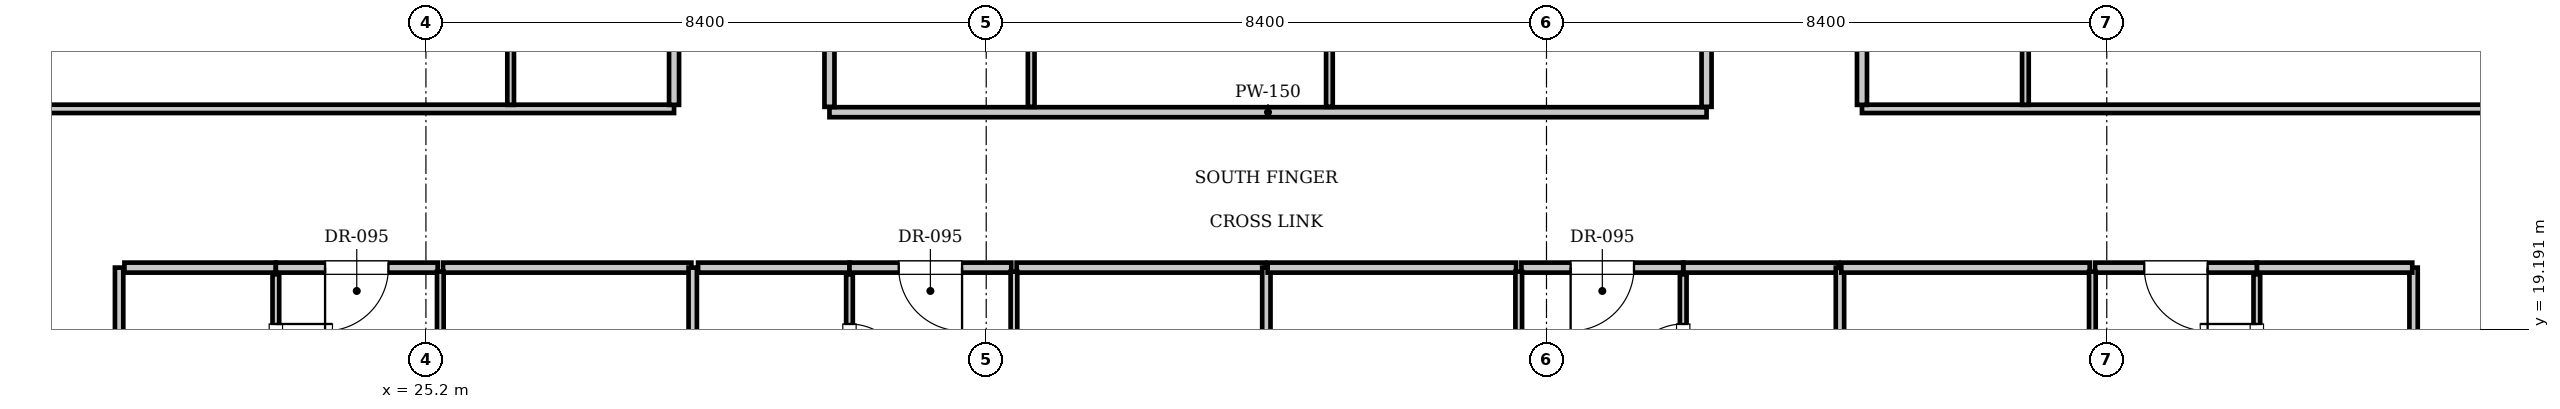
"""IFC4 building model, lengths in metres.
Left out: names, types, materials, properties, quantities, classifications, styles, units other than length and angle.
Written with IfcOpenShell. Run it as: python <this file> out.ifc"""

import sys

from ifc_helpers import new_model, si_unit, direction, frame, frame_2d, origin, place, context, subcontext, project, spatial, rectangle, extrude, element, fill, save


model = new_model("IFC4")
c1 = context("Model", 3, precision=1e-05, world=origin(), true_north=direction((0.0, 1.0)))
c2 = subcontext(c1, "Body", "Model", "MODEL_VIEW")
j1 = project(units=[si_unit("LENGTHUNIT", "METRE"), si_unit("PLANEANGLEUNIT", "RADIAN")], contexts=[c1])
p1 = place(None, origin())
s1 = spatial("IfcSite", under=j1, at=p1, CompositionType="ELEMENT")
p2 = place(p1, origin())
s2 = spatial("IfcBuilding", under=s1, at=p2, CompositionType="ELEMENT")
p3 = place(p2, frame((0.0, 0.0, 258.65)))
s3 = spatial("IfcBuildingStorey", under=s2, at=p3, CompositionType="ELEMENT", Elevation=258.65)
p4 = place(p3, frame((31.25, 22.45, 0.0), z_axis=(0.0, 0.0, 1.0), x_axis=(1.0, 0.0, 0.0)))
e1 = element("IfcWall", 1, at=p4, inside=s3, PredefinedType="PARTITIONING", context=c2, shape_type="SweptSolid", body=[
    extrude(rectangle(XDim=13.15, YDim=0.15, at=frame_2d((6.575, 0.0))), origin(), (0.0, 0.0, 1.0), 3.61),
])
for number, where, z_axis, x_axis in (
    (2, (31.25, 22.53, 0.0), (0.0, 0.0, 1.0), (0.0, 1.0, 0.0)),
    (3, (44.4, 22.53, 0.0), (0.0, 0.0, 1.0), (0.0, 1.0, 0.0)),
):
    element("IfcWall", number, at=place(p3, frame(where, z_axis=z_axis, x_axis=x_axis)), inside=s3, PredefinedType="PARTITIONING", context=c2, shape_type="SweptSolid", body=[
        extrude(rectangle(XDim=8.89, YDim=0.15, at=frame_2d((4.445, 0.0))), origin(), (0.0, 0.0, 1.0), 3.61),
    ])
for number, where, z_axis, x_axis in (
    (4, (34.274, 22.53, 0.0), (0.0, 0.0, 1.0), (0.0, 1.0, 0.0)),
    (5, (38.746, 22.53, 0.0), (0.0, 0.0, 1.0), (0.0, 1.0, 0.0)),
):
    element("IfcWall", number, at=place(p3, frame(where, z_axis=z_axis, x_axis=x_axis)), inside=s3, PredefinedType="PARTITIONING", context=c2, shape_type="SweptSolid", body=[
        extrude(rectangle(XDim=8.89, YDim=0.1, at=frame_2d((4.445, 0.0))), origin(), (0.0, 0.0, 1.0), 3.61),
    ])
for number, where, z_axis, x_axis in (
    (6, (20.6, 14.4, 0.0), (0.0, 0.0, 1.0), (0.0, 1.0, 0.0)),
    (7, (55.0, 14.4, 0.0), (0.0, 0.0, 1.0), (0.0, 1.0, 0.0)),
):
    element("IfcWall", number, at=place(p3, frame(where, z_axis=z_axis, x_axis=x_axis)), inside=s3, PredefinedType="PARTITIONING", context=c2, shape_type="SweptSolid", body=[
        extrude(rectangle(XDim=5.72, YDim=0.125, at=frame_2d((2.86, 0.0))), origin(), (0.0, 0.0, 1.0), 3.61),
    ])
p5 = place(p3, frame((20.68, 20.12, 0.0), z_axis=(0.0, 0.0, 1.0), x_axis=(1.0, 0.0, 0.0)))
e8 = element("IfcWall", 8, at=p5, inside=s3, PredefinedType="PARTITIONING", context=c2, shape_type="SweptSolid", body=[
    extrude(rectangle(XDim=2.27, YDim=0.15, at=frame_2d((1.135, 0.0))), origin(), (0.0, 0.0, 1.0), 3.61),
])
p6 = place(p3, frame((22.95, 17.68, 0.0), z_axis=(0.0, 0.0, 1.0), x_axis=(0.0, 1.0, 0.0)))
e9 = element("IfcWall", 9, at=p6, inside=s3, PredefinedType="PARTITIONING", context=c2, shape_type="SweptSolid", body=[
    extrude(rectangle(XDim=2.34, YDim=0.1, at=frame_2d((1.17, 0.0))), origin(), (0.0, 0.0, 1.0), 3.61),
])
p7 = place(p6, frame((0.745, 0.0, 0.0)))
e10 = element("IfcOpeningElement", 10, at=p7, cuts=e9, PredefinedType="OPENING", context=c2, shape_type="SweptSolid", body=[
    extrude(rectangle(XDim=0.85, YDim=2.1, at=frame_2d((0.425, 1.05))), frame((0.0, 0.06, 0.0), z_axis=(0.0, -1.0, 0.0), x_axis=(1.0, 0.0, 0.0)), (0.0, 0.0, 1.0), 0.12),
])
p8 = place(p3, frame((22.95, 20.12, 0.0), z_axis=(0.0, 0.0, 1.0), x_axis=(1.0, 0.0, 0.0)))
e11 = element("IfcWall", 11, at=p8, inside=s3, PredefinedType="PARTITIONING", context=c2, shape_type="SweptSolid", body=[
    extrude(rectangle(XDim=2.426, YDim=0.15, at=frame_2d((1.213, 0.0))), origin(), (0.0, 0.0, 1.0), 3.61),
])
p9 = place(p8, frame((0.738, 0.0, 0.0)))
e12 = element("IfcOpeningElement", 12, at=p9, cuts=e11, PredefinedType="OPENING", context=c2, shape_type="SweptSolid", body=[
    extrude(rectangle(XDim=0.95, YDim=2.15, at=frame_2d((0.475, 1.075))), frame((0.0, 0.085, 0.0), z_axis=(0.0, -1.0, 0.0), x_axis=(1.0, 0.0, 0.0)), (0.0, 0.0, 1.0), 0.17),
])
p10 = place(p3, frame((25.456, 20.12, 0.0), z_axis=(0.0, 0.0, 1.0), x_axis=(1.0, 0.0, 0.0)))
e13 = element("IfcWall", 13, at=p10, inside=s3, PredefinedType="PARTITIONING", context=c2, shape_type="SweptSolid", body=[
    extrude(rectangle(XDim=3.724, YDim=0.15, at=frame_2d((1.862, 0.0))), origin(), (0.0, 0.0, 1.0), 3.61),
])
p11 = place(p3, frame((25.416, 9.23, 0.0), z_axis=(0.0, 0.0, 1.0), x_axis=(0.0, 1.0, 0.0)))
e14 = element("IfcWall", 14, at=p11, inside=s3, PredefinedType="PARTITIONING", context=c2, shape_type="SweptSolid", body=[
    extrude(rectangle(XDim=10.83, YDim=0.1, at=frame_2d((5.415, 0.0))), origin(), (0.0, 0.0, 1.0), 3.61),
])
p12 = place(p11, frame((1.6, 0.0, 0.0)))
e15 = element("IfcOpeningElement", 15, at=p12, cuts=e14, PredefinedType="OPENING", context=c2, shape_type="SweptSolid", body=[
    extrude(rectangle(XDim=0.9, YDim=2.1, at=frame_2d((0.45, 1.05))), frame((0.0, 0.06, 0.0), z_axis=(0.0, -1.0, 0.0), x_axis=(1.0, 0.0, 0.0)), (0.0, 0.0, 1.0), 0.12),
])
p13 = place(p3, frame((29.2, 9.3, 0.0), z_axis=(0.0, 0.0, 1.0), x_axis=(0.0, 1.0, 0.0)))
e16 = element("IfcWall", 16, at=p13, inside=s3, PredefinedType="PARTITIONING", context=c2, shape_type="SweptSolid", body=[
    extrude(rectangle(XDim=10.82, YDim=0.125, at=frame_2d((5.41, 0.0))), origin(), (0.0, 0.0, 1.0), 3.61),
])
p14 = place(p3, frame((29.28, 20.12, 0.0), z_axis=(0.0, 0.0, 1.0), x_axis=(1.0, 0.0, 0.0)))
e17 = element("IfcWall", 17, at=p14, inside=s3, PredefinedType="PARTITIONING", context=c2, shape_type="SweptSolid", body=[
    extrude(rectangle(XDim=2.27, YDim=0.15, at=frame_2d((1.135, 0.0))), origin(), (0.0, 0.0, 1.0), 3.61),
])
p15 = place(p3, frame((31.55, 17.68, 0.0), z_axis=(0.0, 0.0, 1.0), x_axis=(0.0, 1.0, 0.0)))
e18 = element("IfcWall", 18, at=p15, inside=s3, PredefinedType="PARTITIONING", context=c2, shape_type="SweptSolid", body=[
    extrude(rectangle(XDim=2.34, YDim=0.1, at=frame_2d((1.17, 0.0))), origin(), (0.0, 0.0, 1.0), 3.61),
])
p16 = place(p15, frame((0.745, 0.0, 0.0)))
e19 = element("IfcOpeningElement", 19, at=p16, cuts=e18, PredefinedType="OPENING", context=c2, shape_type="SweptSolid", body=[
    extrude(rectangle(XDim=0.85, YDim=2.1, at=frame_2d((0.425, 1.05))), frame((0.0, 0.06, 0.0), z_axis=(0.0, -1.0, 0.0), x_axis=(1.0, 0.0, 0.0)), (0.0, 0.0, 1.0), 0.12),
])
p17 = place(p3, frame((31.55, 20.12, 0.0), z_axis=(0.0, 0.0, 1.0), x_axis=(1.0, 0.0, 0.0)))
e20 = element("IfcWall", 20, at=p17, inside=s3, PredefinedType="PARTITIONING", context=c2, shape_type="SweptSolid", body=[
    extrude(rectangle(XDim=2.426, YDim=0.15, at=frame_2d((1.213, 0.0))), origin(), (0.0, 0.0, 1.0), 3.61),
])
p18 = place(p17, frame((0.738, 0.0, 0.0)))
e21 = element("IfcOpeningElement", 21, at=p18, cuts=e20, PredefinedType="OPENING", context=c2, shape_type="SweptSolid", body=[
    extrude(rectangle(XDim=0.95, YDim=2.15, at=frame_2d((0.475, 1.075))), frame((0.0, 0.085, 0.0), z_axis=(0.0, -1.0, 0.0), x_axis=(1.0, 0.0, 0.0)), (0.0, 0.0, 1.0), 0.17),
])
p19 = place(p3, frame((34.056, 20.12, 0.0), z_axis=(0.0, 0.0, 1.0), x_axis=(1.0, 0.0, 0.0)))
e22 = element("IfcWall", 22, at=p19, inside=s3, PredefinedType="PARTITIONING", context=c2, shape_type="SweptSolid", body=[
    extrude(rectangle(XDim=3.724, YDim=0.15, at=frame_2d((1.862, 0.0))), origin(), (0.0, 0.0, 1.0), 3.61),
])
p20 = place(p3, frame((34.016, 9.23, 0.0), z_axis=(0.0, 0.0, 1.0), x_axis=(0.0, 1.0, 0.0)))
e23 = element("IfcWall", 23, at=p20, inside=s3, PredefinedType="PARTITIONING", context=c2, shape_type="SweptSolid", body=[
    extrude(rectangle(XDim=10.83, YDim=0.1, at=frame_2d((5.415, 0.0))), origin(), (0.0, 0.0, 1.0), 3.61),
])
p21 = place(p20, frame((1.6, 0.0, 0.0)))
e24 = element("IfcOpeningElement", 24, at=p21, cuts=e23, PredefinedType="OPENING", context=c2, shape_type="SweptSolid", body=[
    extrude(rectangle(XDim=0.9, YDim=2.1, at=frame_2d((0.45, 1.05))), frame((0.0, 0.06, 0.0), z_axis=(0.0, -1.0, 0.0), x_axis=(1.0, 0.0, 0.0)), (0.0, 0.0, 1.0), 0.12),
])
p22 = place(p3, frame((37.8, 9.3, 0.0), z_axis=(0.0, 0.0, 1.0), x_axis=(0.0, 1.0, 0.0)))
e25 = element("IfcWall", 25, at=p22, inside=s3, PredefinedType="PARTITIONING", context=c2, shape_type="SweptSolid", body=[
    extrude(rectangle(XDim=10.82, YDim=0.125, at=frame_2d((5.41, 0.0))), origin(), (0.0, 0.0, 1.0), 3.457),
])
p23 = place(p3, frame((44.05, 20.12, 0.0), z_axis=(0.0, 0.0, 1.0), x_axis=(1.0, 0.0, 0.0)))
e26 = element("IfcWall", 26, at=p23, inside=s3, PredefinedType="PARTITIONING", context=c2, shape_type="SweptSolid", body=[
    extrude(rectangle(XDim=2.33, YDim=0.15, at=frame_2d((1.165, 0.0))), origin(), (0.0, 0.0, 1.0), 3.61),
])
p24 = place(p3, frame((44.05, 17.68, 0.0), z_axis=(0.0, 0.0, 1.0), x_axis=(0.0, 1.0, 0.0)))
e27 = element("IfcWall", 27, at=p24, inside=s3, PredefinedType="PARTITIONING", context=c2, shape_type="SweptSolid", body=[
    extrude(rectangle(XDim=2.34, YDim=0.1, at=frame_2d((1.17, 0.0))), origin(), (0.0, 0.0, 1.0), 3.61),
])
p25 = place(p24, frame((0.745, 0.0, 0.0)))
e28 = element("IfcOpeningElement", 28, at=p25, cuts=e27, PredefinedType="OPENING", context=c2, shape_type="SweptSolid", body=[
    extrude(rectangle(XDim=0.85, YDim=2.1, at=frame_2d((0.425, 1.05))), frame((0.0, 0.06, 0.0), z_axis=(0.0, -1.0, 0.0), x_axis=(1.0, 0.0, 0.0)), (0.0, 0.0, 1.0), 0.12),
])
p26 = place(p3, frame((37.82, 20.12, 0.0), z_axis=(0.0, 0.0, 1.0), x_axis=(1.0, 0.0, 0.0)))
e29 = element("IfcWall", 29, at=p26, inside=s3, PredefinedType="PARTITIONING", context=c2, shape_type="SweptSolid", body=[
    extrude(rectangle(XDim=3.724, YDim=0.15, at=frame_2d((1.862, 0.0))), origin(), (0.0, 0.0, 1.0), 3.61),
])
p27 = place(p3, frame((41.624, 20.12, 0.0), z_axis=(0.0, 0.0, 1.0), x_axis=(1.0, 0.0, 0.0)))
e30 = element("IfcWall", 30, at=p27, inside=s3, PredefinedType="PARTITIONING", context=c2, shape_type="SweptSolid", body=[
    extrude(rectangle(XDim=2.426, YDim=0.15, at=frame_2d((1.213, 0.0))), origin(), (0.0, 0.0, 1.0), 3.61),
])
p28 = place(p27, frame((0.738, 0.0, 0.0)))
e31 = element("IfcOpeningElement", 31, at=p28, cuts=e30, PredefinedType="OPENING", context=c2, shape_type="SweptSolid", body=[
    extrude(rectangle(XDim=0.95, YDim=2.15, at=frame_2d((0.475, 1.075))), frame((0.0, 0.085, 0.0), z_axis=(0.0, -1.0, 0.0), x_axis=(1.0, 0.0, 0.0)), (0.0, 0.0, 1.0), 0.17),
])
p29 = place(p3, frame((41.584, 9.23, 0.0), z_axis=(0.0, 0.0, 1.0), x_axis=(0.0, 1.0, 0.0)))
e32 = element("IfcWall", 32, at=p29, inside=s3, PredefinedType="PARTITIONING", context=c2, shape_type="SweptSolid", body=[
    extrude(rectangle(XDim=10.83, YDim=0.1, at=frame_2d((5.415, 0.0))), origin(), (0.0, 0.0, 1.0), 3.61),
])
p30 = place(p29, frame((1.6, 0.0, 0.0)))
e33 = element("IfcOpeningElement", 33, at=p30, cuts=e32, PredefinedType="OPENING", context=c2, shape_type="SweptSolid", body=[
    extrude(rectangle(XDim=0.9, YDim=2.1, at=frame_2d((0.45, 1.05))), frame((0.0, 0.06, 0.0), z_axis=(0.0, -1.0, 0.0), x_axis=(1.0, 0.0, 0.0)), (0.0, 0.0, 1.0), 0.12),
])
p31 = place(p3, frame((46.4, 9.3, 0.0), z_axis=(0.0, 0.0, 1.0), x_axis=(0.0, 1.0, 0.0)))
e34 = element("IfcWall", 34, at=p31, inside=s3, PredefinedType="PARTITIONING", context=c2, shape_type="SweptSolid", body=[
    extrude(rectangle(XDim=10.82, YDim=0.125, at=frame_2d((5.41, 0.0))), origin(), (0.0, 0.0, 1.0), 3.61),
])
p32 = place(p3, frame((52.65, 20.12, 0.0), z_axis=(0.0, 0.0, 1.0), x_axis=(1.0, 0.0, 0.0)))
e35 = element("IfcWall", 35, at=p32, inside=s3, PredefinedType="PARTITIONING", context=c2, shape_type="SweptSolid", body=[
    extrude(rectangle(XDim=2.33, YDim=0.15, at=frame_2d((1.165, 0.0))), origin(), (0.0, 0.0, 1.0), 3.61),
])
p33 = place(p3, frame((52.65, 17.68, 0.0), z_axis=(0.0, 0.0, 1.0), x_axis=(0.0, 1.0, 0.0)))
e36 = element("IfcWall", 36, at=p33, inside=s3, PredefinedType="PARTITIONING", context=c2, shape_type="SweptSolid", body=[
    extrude(rectangle(XDim=2.34, YDim=0.1, at=frame_2d((1.17, 0.0))), origin(), (0.0, 0.0, 1.0), 3.61),
])
p34 = place(p33, frame((0.745, 0.0, 0.0)))
e37 = element("IfcOpeningElement", 37, at=p34, cuts=e36, PredefinedType="OPENING", context=c2, shape_type="SweptSolid", body=[
    extrude(rectangle(XDim=0.85, YDim=2.1, at=frame_2d((0.425, 1.05))), frame((0.0, 0.06, 0.0), z_axis=(0.0, -1.0, 0.0), x_axis=(1.0, 0.0, 0.0)), (0.0, 0.0, 1.0), 0.12),
])
p35 = place(p3, frame((46.42, 20.12, 0.0), z_axis=(0.0, 0.0, 1.0), x_axis=(1.0, 0.0, 0.0)))
e38 = element("IfcWall", 38, at=p35, inside=s3, PredefinedType="PARTITIONING", context=c2, shape_type="SweptSolid", body=[
    extrude(rectangle(XDim=3.724, YDim=0.15, at=frame_2d((1.862, 0.0))), origin(), (0.0, 0.0, 1.0), 3.61),
])
p36 = place(p3, frame((50.224, 20.12, 0.0), z_axis=(0.0, 0.0, 1.0), x_axis=(1.0, 0.0, 0.0)))
e39 = element("IfcWall", 39, at=p36, inside=s3, PredefinedType="PARTITIONING", context=c2, shape_type="SweptSolid", body=[
    extrude(rectangle(XDim=2.426, YDim=0.15, at=frame_2d((1.213, 0.0))), origin(), (0.0, 0.0, 1.0), 3.61),
])
p37 = place(p36, frame((0.738, 0.0, 0.0)))
e40 = element("IfcOpeningElement", 40, at=p37, cuts=e39, PredefinedType="OPENING", context=c2, shape_type="SweptSolid", body=[
    extrude(rectangle(XDim=0.95, YDim=2.15, at=frame_2d((0.475, 1.075))), frame((0.0, 0.085, 0.0), z_axis=(0.0, -1.0, 0.0), x_axis=(1.0, 0.0, 0.0)), (0.0, 0.0, 1.0), 0.17),
])
p38 = place(p3, frame((50.184, 9.23, 0.0), z_axis=(0.0, 0.0, 1.0), x_axis=(0.0, 1.0, 0.0)))
e41 = element("IfcWall", 41, at=p38, inside=s3, PredefinedType="PARTITIONING", context=c2, shape_type="SweptSolid", body=[
    extrude(rectangle(XDim=10.83, YDim=0.1, at=frame_2d((5.415, 0.0))), origin(), (0.0, 0.0, 1.0), 3.61),
])
p39 = place(p38, frame((1.6, 0.0, 0.0)))
e42 = element("IfcOpeningElement", 42, at=p39, cuts=e41, PredefinedType="OPENING", context=c2, shape_type="SweptSolid", body=[
    extrude(rectangle(XDim=0.9, YDim=2.1, at=frame_2d((0.45, 1.05))), frame((0.0, 0.06, 0.0), z_axis=(0.0, -1.0, 0.0), x_axis=(1.0, 0.0, 0.0)), (0.0, 0.0, 1.0), 0.12),
])
p40 = place(p3, frame((15.5, 22.5, 0.0), z_axis=(0.0, 0.0, 1.0), x_axis=(1.0, 0.0, 0.0)))
e43 = element("IfcWall", 43, at=p40, inside=s3, PredefinedType="PARTITIONING", context=c2, shape_type="SweptSolid", body=[
    extrude(rectangle(XDim=13.42, YDim=0.125, at=frame_2d((6.71, 0.0))), origin(), (0.0, 0.0, 1.0), 3.61),
])
p41 = place(p3, frame((46.73, 22.5, 0.0), z_axis=(0.0, 0.0, 1.0), x_axis=(1.0, 0.0, 0.0)))
e44 = element("IfcWall", 44, at=p41, inside=s3, PredefinedType="PARTITIONING", context=c2, shape_type="SweptSolid", body=[
    extrude(rectangle(XDim=13.37, YDim=0.125, at=frame_2d((6.685, 0.0))), origin(), (0.0, 0.0, 1.0), 3.61),
])
p42 = place(p3, frame((28.92, 22.56, 0.0), z_axis=(0.0, 0.0, 1.0), x_axis=(0.0, 1.0, 0.0)))
e45 = element("IfcWall", 45, at=p42, inside=s3, PredefinedType="PARTITIONING", context=c2, shape_type="SweptSolid", body=[
    extrude(rectangle(XDim=1.89, YDim=0.15, at=frame_2d((0.945, 0.0))), origin(), (0.0, 0.0, 1.0), 3.61),
])
p43 = place(p3, frame((26.47, 22.56, 0.0), z_axis=(0.0, 0.0, 1.0), x_axis=(0.0, 1.0, 0.0)))
e46 = element("IfcWall", 46, at=p43, inside=s3, PredefinedType="PARTITIONING", context=c2, shape_type="SweptSolid", body=[
    extrude(rectangle(XDim=1.89, YDim=0.1, at=frame_2d((0.945, 0.0))), origin(), (0.0, 0.0, 1.0), 3.61),
])
p44 = place(p3, frame((46.73, 22.56, 0.0), z_axis=(0.0, 0.0, 1.0), x_axis=(0.0, 1.0, 0.0)))
e47 = element("IfcWall", 47, at=p44, inside=s3, PredefinedType="PARTITIONING", context=c2, shape_type="SweptSolid", body=[
    extrude(rectangle(XDim=1.89, YDim=0.15, at=frame_2d((0.945, 0.0))), origin(), (0.0, 0.0, 1.0), 3.61),
])
p45 = place(p3, frame((49.18, 22.56, 0.0), z_axis=(0.0, 0.0, 1.0), x_axis=(0.0, 1.0, 0.0)))
e48 = element("IfcWall", 48, at=p45, inside=s3, PredefinedType="PARTITIONING", context=c2, shape_type="SweptSolid", body=[
    extrude(rectangle(XDim=1.89, YDim=0.1, at=frame_2d((0.945, 0.0))), origin(), (0.0, 0.0, 1.0), 3.61),
])
p46 = place(p7, frame((0.85, 0.0, 0.0), z_axis=(0.0, 0.0, 1.0), x_axis=(-1.0, 0.0, 0.0)))
e49 = element("IfcDoor", 49, at=p46, inside=s3, OperationType="SINGLE_SWING_LEFT", PredefinedType="DOOR", context=c2, shape_type="SweptSolid", body=[
    extrude(rectangle(XDim=0.85, YDim=2.1, at=frame_2d((0.425, 1.05))), frame((0.0, 0.025, 0.0), z_axis=(0.0, -1.0, 0.0), x_axis=(1.0, 0.0, 0.0)), (0.0, 0.0, 1.0), 0.05),
])
fill(e10, e49)
p47 = place(p9, frame((0.95, 0.0, 0.0), z_axis=(0.0, 0.0, 1.0), x_axis=(-1.0, 0.0, 0.0)))
e50 = element("IfcDoor", 50, at=p47, inside=s3, OperationType="SINGLE_SWING_RIGHT", PredefinedType="DOOR", context=c2, shape_type="SweptSolid", body=[
    extrude(rectangle(XDim=0.95, YDim=2.15, at=frame_2d((0.475, 1.075))), frame((0.0, 0.025, 0.0), z_axis=(0.0, -1.0, 0.0), x_axis=(1.0, 0.0, 0.0)), (0.0, 0.0, 1.0), 0.05),
])
fill(e12, e50)
p48 = place(p16, frame((0.85, 0.0, 0.0), z_axis=(0.0, 0.0, 1.0), x_axis=(-1.0, 0.0, 0.0)))
e51 = element("IfcDoor", 51, at=p48, inside=s3, OperationType="SINGLE_SWING_RIGHT", PredefinedType="DOOR", context=c2, shape_type="SweptSolid", body=[
    extrude(rectangle(XDim=0.85, YDim=2.1, at=frame_2d((0.425, 1.05))), frame((0.0, 0.025, 0.0), z_axis=(0.0, -1.0, 0.0), x_axis=(1.0, 0.0, 0.0)), (0.0, 0.0, 1.0), 0.05),
])
fill(e19, e51)
p49 = place(p18, frame((0.95, 0.0, 0.0), z_axis=(0.0, 0.0, 1.0), x_axis=(-1.0, 0.0, 0.0)))
e52 = element("IfcDoor", 52, at=p49, inside=s3, OperationType="SINGLE_SWING_LEFT", PredefinedType="DOOR", context=c2, shape_type="SweptSolid", body=[
    extrude(rectangle(XDim=0.95, YDim=2.15, at=frame_2d((0.475, 1.075))), frame((0.0, 0.025, 0.0), z_axis=(0.0, -1.0, 0.0), x_axis=(1.0, 0.0, 0.0)), (0.0, 0.0, 1.0), 0.05),
])
fill(e21, e52)
p50 = place(p25, origin())
e53 = element("IfcDoor", 53, at=p50, inside=s3, OperationType="SINGLE_SWING_LEFT", PredefinedType="DOOR", context=c2, shape_type="SweptSolid", body=[
    extrude(rectangle(XDim=0.85, YDim=2.1, at=frame_2d((0.425, 1.05))), frame((0.0, 0.025, 0.0), z_axis=(0.0, -1.0, 0.0), x_axis=(1.0, 0.0, 0.0)), (0.0, 0.0, 1.0), 0.05),
])
fill(e28, e53)
p51 = place(p28, frame((0.95, 0.0, 0.0), z_axis=(0.0, 0.0, 1.0), x_axis=(-1.0, 0.0, 0.0)))
e54 = element("IfcDoor", 54, at=p51, inside=s3, OperationType="SINGLE_SWING_RIGHT", PredefinedType="DOOR", context=c2, shape_type="SweptSolid", body=[
    extrude(rectangle(XDim=0.95, YDim=2.15, at=frame_2d((0.475, 1.075))), frame((0.0, 0.025, 0.0), z_axis=(0.0, -1.0, 0.0), x_axis=(1.0, 0.0, 0.0)), (0.0, 0.0, 1.0), 0.05),
])
fill(e31, e54)
p52 = place(p34, origin())
e55 = element("IfcDoor", 55, at=p52, inside=s3, OperationType="SINGLE_SWING_RIGHT", PredefinedType="DOOR", context=c2, shape_type="SweptSolid", body=[
    extrude(rectangle(XDim=0.85, YDim=2.1, at=frame_2d((0.425, 1.05))), frame((0.0, 0.025, 0.0), z_axis=(0.0, -1.0, 0.0), x_axis=(1.0, 0.0, 0.0)), (0.0, 0.0, 1.0), 0.05),
])
fill(e37, e55)
p53 = place(p37, frame((0.95, 0.0, 0.0), z_axis=(0.0, 0.0, 1.0), x_axis=(-1.0, 0.0, 0.0)))
e56 = element("IfcDoor", 56, at=p53, inside=s3, OperationType="SINGLE_SWING_LEFT", PredefinedType="DOOR", context=c2, shape_type="SweptSolid", body=[
    extrude(rectangle(XDim=0.95, YDim=2.15, at=frame_2d((0.475, 1.075))), frame((0.0, 0.025, 0.0), z_axis=(0.0, -1.0, 0.0), x_axis=(1.0, 0.0, 0.0)), (0.0, 0.0, 1.0), 0.05),
])
fill(e40, e56)
save(model, sys.argv[1])
